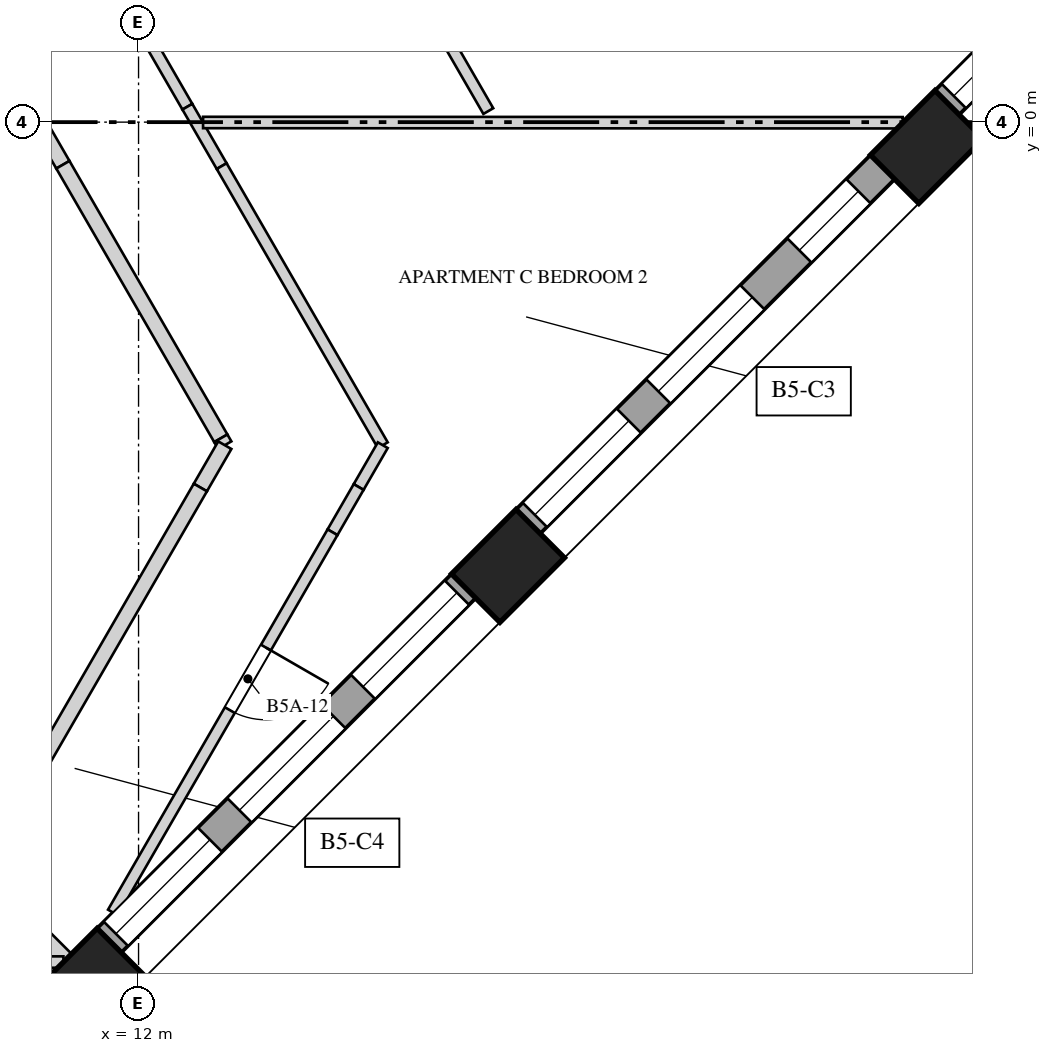
"""IFC4 building model, lengths in metres.
Left out: names, types, materials, properties, quantities, classifications, styles, units other than length and angle.
Written with IfcOpenShell. Run it as: python <this file> out.ifc"""

import sys

from ifc_helpers import new_model, si_unit, direction, frame, frame_2d, origin, origin_2d, place, context, subcontext, project, spatial, rectangle, extrude, element, fill, save


model = new_model("IFC4")
c1 = context("Model", 3, precision=1e-05, world=origin(), true_north=direction((0.0, 1.0)))
c2 = subcontext(c1, "Body", "Model", "MODEL_VIEW")
j1 = project(units=[si_unit("LENGTHUNIT", "METRE"), si_unit("PLANEANGLEUNIT", "RADIAN")], contexts=[c1])
p1 = place(None, origin())
s1 = spatial("IfcSite", under=j1, at=p1, CompositionType="ELEMENT")
p2 = place(p1, origin())
s2 = spatial("IfcBuilding", under=s1, at=p2, CompositionType="ELEMENT")
p3 = place(p2, frame((0.0, 0.0, 200.0)))
s3 = spatial("IfcBuildingStorey", under=s2, at=p3, CompositionType="ELEMENT", Elevation=200.0)
for number, where, z_axis, x_axis in (
    (1, (11.349, -11.349, -0.35), (0.0, 0.0, 1.0), (0.707, 0.707, 0.0)),
    (2, (16.86, -5.838, -0.35), (0.0, 0.0, 1.0), (0.707, 0.707, 0.0)),
    (3, (22.372, -0.326, -0.35), (0.0, 0.0, 1.0), (0.707, 0.707, 0.0)),
):
    element("IfcColumn", number, at=place(p3, frame(where, z_axis=z_axis, x_axis=x_axis)), inside=s3, PredefinedType="COLUMN", context=c2, shape_type="SweptSolid", body=[
        extrude(rectangle(XDim=1.2, YDim=0.9, at=origin_2d()), origin(), (0.0, 0.0, 1.0), 4.35),
    ])
p4 = place(p3, frame((11.614, -10.766, 0.0), z_axis=(0.0, 0.0, 1.0), x_axis=(0.707106781187, 0.707106781187, 0.0)))
e4 = element("IfcWall", 4, at=p4, inside=s3, PredefinedType="SOLIDWALL", context=c2, shape_type="SweptSolid", body=[
    extrude(rectangle(XDim=6.594, YDim=0.45, at=frame_2d((3.297, 0.0))), origin(), (0.0, 0.0, 1.0), 3.3),
])
p5 = place(p4, frame((0.124, 0.0, 0.5)))
e5 = element("IfcOpeningElement", 5, at=p5, cuts=e4, PredefinedType="OPENING", context=c2, shape_type="SweptSolid", body=[
    extrude(rectangle(XDim=1.75, YDim=2.65, at=frame_2d((0.875, 1.325))), frame((0.0, 0.235, 0.0), z_axis=(0.0, -1.0, 0.0), x_axis=(1.0, 0.0, 0.0)), (0.0, 0.0, 1.0), 0.47),
])
p6 = place(p4, frame((2.422, 0.0, 0.5)))
e6 = element("IfcOpeningElement", 6, at=p6, cuts=e4, PredefinedType="OPENING", context=c2, shape_type="SweptSolid", body=[
    extrude(rectangle(XDim=1.75, YDim=2.65, at=frame_2d((0.875, 1.325))), frame((0.0, 0.235, 0.0), z_axis=(0.0, -1.0, 0.0), x_axis=(1.0, 0.0, 0.0)), (0.0, 0.0, 1.0), 0.47),
])
p7 = place(p4, frame((4.72, 0.0, 0.5)))
e7 = element("IfcOpeningElement", 7, at=p7, cuts=e4, PredefinedType="OPENING", context=c2, shape_type="SweptSolid", body=[
    extrude(rectangle(XDim=1.75, YDim=2.65, at=frame_2d((0.875, 1.325))), frame((0.0, 0.235, 0.0), z_axis=(0.0, -1.0, 0.0), x_axis=(1.0, 0.0, 0.0)), (0.0, 0.0, 1.0), 0.47),
])
p8 = place(p3, frame((17.125, -5.254, 0.0), z_axis=(0.0, 0.0, 1.0), x_axis=(0.707106781187, 0.707106781187, 0.0)))
e8 = element("IfcWall", 8, at=p8, inside=s3, PredefinedType="SOLIDWALL", context=c2, shape_type="SweptSolid", body=[
    extrude(rectangle(XDim=6.594, YDim=0.45, at=frame_2d((3.297, 0.0))), origin(), (0.0, 0.0, 1.0), 3.3),
])
p9 = place(p8, frame((0.124, 0.0, 0.5)))
e9 = element("IfcOpeningElement", 9, at=p9, cuts=e8, PredefinedType="OPENING", context=c2, shape_type="SweptSolid", body=[
    extrude(rectangle(XDim=1.75, YDim=2.65, at=frame_2d((0.875, 1.325))), frame((0.0, 0.235, 0.0), z_axis=(0.0, -1.0, 0.0), x_axis=(1.0, 0.0, 0.0)), (0.0, 0.0, 1.0), 0.47),
])
p10 = place(p8, frame((2.422, 0.0, 0.5)))
e10 = element("IfcOpeningElement", 10, at=p10, cuts=e8, PredefinedType="OPENING", context=c2, shape_type="SweptSolid", body=[
    extrude(rectangle(XDim=1.75, YDim=2.65, at=frame_2d((0.875, 1.325))), frame((0.0, 0.235, 0.0), z_axis=(0.0, -1.0, 0.0), x_axis=(1.0, 0.0, 0.0)), (0.0, 0.0, 1.0), 0.47),
])
p11 = place(p8, frame((5.045, 0.0, 0.5)))
e11 = element("IfcOpeningElement", 11, at=p11, cuts=e8, PredefinedType="OPENING", context=c2, shape_type="SweptSolid", body=[
    extrude(rectangle(XDim=1.1, YDim=2.65, at=frame_2d((0.55, 1.325))), frame((0.0, 0.235, 0.0), z_axis=(0.0, -1.0, 0.0), x_axis=(1.0, 0.0, 0.0)), (0.0, 0.0, 1.0), 0.47),
])
p12 = place(p3, frame((22.637, 0.257, 0.0), z_axis=(0.0, 0.0, 1.0), x_axis=(0.707106781187, 0.707106781187, 0.0)))
e12 = element("IfcWall", 12, at=p12, inside=s3, PredefinedType="SOLIDWALL", context=c2, shape_type="SweptSolid", body=[
    extrude(rectangle(XDim=1.998, YDim=0.45, at=frame_2d((0.999, 0.0))), origin(), (0.0, 0.0, 1.0), 3.3),
])
p13 = place(p12, frame((0.124, 0.0, 0.5)))
e13 = element("IfcOpeningElement", 13, at=p13, cuts=e12, PredefinedType="OPENING", context=c2, shape_type="SweptSolid", body=[
    extrude(rectangle(XDim=1.75, YDim=2.65, at=frame_2d((0.875, 1.325))), frame((0.0, 0.235, 0.0), z_axis=(0.0, -1.0, 0.0), x_axis=(1.0, 0.0, 0.0)), (0.0, 0.0, 1.0), 0.47),
])
p14 = place(p3, frame((11.803, 1.656, 0.0), z_axis=(0.0, 0.0, 1.0), x_axis=(0.499974444137, -0.866040157966, 0.0)))
e14 = element("IfcWall", 14, at=p14, inside=s3, PredefinedType="PARTITIONING", context=c2, shape_type="SweptSolid", body=[
    extrude(rectangle(XDim=1.677, YDim=0.15, at=frame_2d((0.839, 0.0))), origin(), (0.0, 0.0, 1.0), 3.65),
])
p15 = place(p3, frame((12.642, 0.203, 0.0), z_axis=(0.0, 0.0, 1.0), x_axis=(0.500065807255, -0.865987406614, 0.0)))
e15 = element("IfcWall", 15, at=p15, inside=s3, PredefinedType="PARTITIONING", context=c2, shape_type="SweptSolid", body=[
    extrude(rectangle(XDim=0.903, YDim=0.15, at=frame_2d((0.451, 0.0))), origin(), (0.0, 0.0, 1.0), 2.75),
])
p16 = place(p3, frame((13.094, -0.579, 0.0), z_axis=(0.0, 0.0, 1.0), x_axis=(0.499991648869, -0.866030225258, 0.0)))
e16 = element("IfcWall", 16, at=p16, inside=s3, PredefinedType="PARTITIONING", context=c2, shape_type="SweptSolid", body=[
    extrude(rectangle(XDim=4.239, YDim=0.15, at=frame_2d((2.12, 0.0))), origin(), (0.0, 0.0, 1.0), 3.65),
])
p17 = place(p3, frame((9.35, -9.35, 0.0), z_axis=(0.0, 0.0, 1.0), x_axis=(0.707106781187, -0.707106781187, 0.0)))
e17 = element("IfcWall", 17, at=p17, inside=s3, PredefinedType="SOLIDWALL", context=c2, shape_type="SweptSolid", body=[
    extrude(rectangle(XDim=2.377, YDim=0.25, at=frame_2d((1.188, 0.0))), origin(), (0.0, 0.0, 1.0), 2.95),
])
p18 = place(p3, frame((11.012, -11.05, 0.0), z_axis=(0.0, 0.0, 1.0), x_axis=(-1.0, 0.0, 0.0)))
e18 = element("IfcWall", 18, at=p18, inside=s3, PredefinedType="PARTITIONING", context=c2, shape_type="SweptSolid", body=[
    extrude(rectangle(XDim=0.439, YDim=0.15, at=frame_2d((0.219, 0.0))), origin(), (0.0, 0.0, 1.0), 2.95),
])
p19 = place(p3, frame((15.364, 2.289, 0.0), z_axis=(0.0, 0.0, 1.0), x_axis=(0.499978546328, -0.866037789714, 0.0)))
e19 = element("IfcWall", 19, at=p19, inside=s3, PredefinedType="PARTITIONING", context=c2, shape_type="SweptSolid", body=[
    extrude(rectangle(XDim=2.476, YDim=0.15, at=frame_2d((1.238, 0.0))), origin(), (0.0, 0.0, 1.0), 3.65),
])
p20 = place(p3, frame((15.213, -4.25, 0.0), z_axis=(0.0, 0.0, 1.0), x_axis=(-0.499899851437, -0.866083216864, 0.0)))
e20 = element("IfcWall", 20, at=p20, inside=s3, PredefinedType="PARTITIONING", context=c2, shape_type="SweptSolid", body=[
    extrude(rectangle(XDim=0.635, YDim=0.15, at=frame_2d((0.318, 0.0))), origin(), (0.0, 0.0, 1.0), 3.65),
])
p21 = place(p3, frame((14.896, -4.8, 0.0), z_axis=(0.0, 0.0, 1.0), x_axis=(-0.5001118933, -0.865960792519, 0.0)))
e21 = element("IfcWall", 21, at=p21, inside=s3, PredefinedType="PARTITIONING", context=c2, shape_type="SweptSolid", body=[
    extrude(rectangle(XDim=0.687, YDim=0.15, at=frame_2d((0.344, 0.0))), origin(), (0.0, 0.0, 1.0), 2.95),
])
p22 = place(p3, frame((14.552, -5.396, 0.0), z_axis=(0.0, 0.0, 1.0), x_axis=(-0.499984646442, -0.866034267984, 0.0)))
e22 = element("IfcWall", 22, at=p22, inside=s3, PredefinedType="PARTITIONING", context=c2, shape_type="SweptSolid", body=[
    extrude(rectangle(XDim=5.777, YDim=0.15, at=frame_2d((2.888, 0.0))), origin(), (0.0, 0.0, 1.0), 3.65),
])
p23 = place(p22, frame((1.752, 0.0, 0.0)))
e23 = element("IfcOpeningElement", 23, at=p23, cuts=e22, PredefinedType="OPENING", context=c2, shape_type="SweptSolid", body=[
    extrude(rectangle(XDim=0.95, YDim=2.4, at=frame_2d((0.475, 1.2))), frame((0.0, 0.085, 0.0), z_axis=(0.0, -1.0, 0.0), x_axis=(1.0, 0.0, 0.0)), (0.0, 0.0, 1.0), 0.17),
])
p24 = place(p3, frame((22.053, -0.008, 0.0), z_axis=(0.0, 0.0, 1.0), x_axis=(-0.999999931056, 0.00037133306, 0.0)))
e24 = element("IfcWall", 24, at=p24, inside=s3, PredefinedType="PARTITIONING", context=c2, shape_type="SweptSolid", body=[
    extrude(rectangle(XDim=9.205, YDim=0.15, at=frame_2d((4.602, 0.0))), origin(), (0.0, 0.0, 1.0), 2.75),
])
p25 = place(p3, frame((10.539, 0.246, 0.0), z_axis=(0.0, 0.0, 1.0), x_axis=(0.499971966783, -0.866041588165, 0.0)))
e25 = element("IfcWall", 25, at=p25, inside=s3, PredefinedType="SOLIDWALL", context=c2, shape_type="SweptSolid", body=[
    extrude(rectangle(XDim=0.932, YDim=0.2, at=frame_2d((0.466, 0.0))), origin(), (0.0, 0.0, 1.0), 2.75),
])
p26 = place(p3, frame((11.005, -0.561, 0.0), z_axis=(0.0, 0.0, 1.0), x_axis=(0.499993700073, -0.866029041019, 0.0)))
e26 = element("IfcWall", 26, at=p26, inside=s3, PredefinedType="SOLIDWALL", context=c2, shape_type="SweptSolid", body=[
    extrude(rectangle(XDim=4.155, YDim=0.2, at=frame_2d((2.078, 0.0))), origin(), (0.0, 0.0, 1.0), 3.65),
])
p27 = place(p3, frame((13.082, -4.159, 0.0), z_axis=(0.0, 0.0, 1.0), x_axis=(0.500393920955, -0.865797853931, 0.0)))
e27 = element("IfcWall", 27, at=p27, inside=s3, PredefinedType="SOLIDWALL", context=c2, shape_type="SweptSolid", body=[
    extrude(rectangle(XDim=0.105, YDim=0.2, at=frame_2d((0.052, 0.0))), origin(), (0.0, 0.0, 1.0), 2.95),
])
p28 = place(p3, frame((13.135, -4.25, 0.0), z_axis=(0.0, 0.0, 1.0), x_axis=(-0.500018234033, -0.866014876105, 0.0)))
e28 = element("IfcWall", 28, at=p28, inside=s3, PredefinedType="SOLIDWALL", context=c2, shape_type="SweptSolid", body=[
    extrude(rectangle(XDim=0.643, YDim=0.2, at=frame_2d((0.322, 0.0))), origin(), (0.0, 0.0, 1.0), 2.95),
])
p29 = place(p3, frame((12.813, -4.807, 0.0), z_axis=(0.0, 0.0, 1.0), x_axis=(-0.499992949462, -0.866029474376, 0.0)))
e29 = element("IfcWall", 29, at=p29, inside=s3, PredefinedType="SOLIDWALL", context=c2, shape_type="SweptSolid", body=[
    extrude(rectangle(XDim=5.13, YDim=0.2, at=frame_2d((2.565, 0.0))), origin(), (0.0, 0.0, 1.0), 3.65),
])
p30 = place(p5, origin())
e30 = element("IfcWindow", 30, at=p30, inside=s3, PartitioningType="SINGLE_PANEL", PredefinedType="WINDOW", context=c2, shape_type="SweptSolid", body=[
    extrude(rectangle(XDim=1.75, YDim=2.65, at=frame_2d((0.875, 1.325))), frame((0.0, 0.03, 0.0), z_axis=(0.0, -1.0, 0.0), x_axis=(1.0, 0.0, 0.0)), (0.0, 0.0, 1.0), 0.06),
])
fill(e5, e30)
p31 = place(p6, origin())
e31 = element("IfcWindow", 31, at=p31, inside=s3, PartitioningType="SINGLE_PANEL", PredefinedType="WINDOW", context=c2, shape_type="SweptSolid", body=[
    extrude(rectangle(XDim=1.75, YDim=2.65, at=frame_2d((0.875, 1.325))), frame((0.0, 0.03, 0.0), z_axis=(0.0, -1.0, 0.0), x_axis=(1.0, 0.0, 0.0)), (0.0, 0.0, 1.0), 0.06),
])
fill(e6, e31)
p32 = place(p7, origin())
e32 = element("IfcWindow", 32, at=p32, inside=s3, PartitioningType="SINGLE_PANEL", PredefinedType="WINDOW", context=c2, shape_type="SweptSolid", body=[
    extrude(rectangle(XDim=1.75, YDim=2.65, at=frame_2d((0.875, 1.325))), frame((0.0, 0.03, 0.0), z_axis=(0.0, -1.0, 0.0), x_axis=(1.0, 0.0, 0.0)), (0.0, 0.0, 1.0), 0.06),
])
fill(e7, e32)
p33 = place(p9, origin())
e33 = element("IfcWindow", 33, at=p33, inside=s3, PartitioningType="SINGLE_PANEL", PredefinedType="WINDOW", context=c2, shape_type="SweptSolid", body=[
    extrude(rectangle(XDim=1.75, YDim=2.65, at=frame_2d((0.875, 1.325))), frame((0.0, 0.03, 0.0), z_axis=(0.0, -1.0, 0.0), x_axis=(1.0, 0.0, 0.0)), (0.0, 0.0, 1.0), 0.06),
])
fill(e9, e33)
p34 = place(p10, origin())
e34 = element("IfcWindow", 34, at=p34, inside=s3, PartitioningType="SINGLE_PANEL", PredefinedType="WINDOW", context=c2, shape_type="SweptSolid", body=[
    extrude(rectangle(XDim=1.75, YDim=2.65, at=frame_2d((0.875, 1.325))), frame((0.0, 0.03, 0.0), z_axis=(0.0, -1.0, 0.0), x_axis=(1.0, 0.0, 0.0)), (0.0, 0.0, 1.0), 0.06),
])
fill(e10, e34)
p35 = place(p11, origin())
e35 = element("IfcWindow", 35, at=p35, inside=s3, PartitioningType="SINGLE_PANEL", PredefinedType="WINDOW", context=c2, shape_type="SweptSolid", body=[
    extrude(rectangle(XDim=1.1, YDim=2.65, at=frame_2d((0.55, 1.325))), frame((0.0, 0.03, 0.0), z_axis=(0.0, -1.0, 0.0), x_axis=(1.0, 0.0, 0.0)), (0.0, 0.0, 1.0), 0.06),
])
fill(e11, e35)
p36 = place(p13, origin())
e36 = element("IfcWindow", 36, at=p36, inside=s3, PartitioningType="SINGLE_PANEL", PredefinedType="WINDOW", context=c2, shape_type="SweptSolid", body=[
    extrude(rectangle(XDim=1.75, YDim=2.65, at=frame_2d((0.875, 1.325))), frame((0.0, 0.03, 0.0), z_axis=(0.0, -1.0, 0.0), x_axis=(1.0, 0.0, 0.0)), (0.0, 0.0, 1.0), 0.06),
])
fill(e13, e36)
p37 = place(p23, origin())
e37 = element("IfcDoor", 37, at=p37, inside=s3, OperationType="SINGLE_SWING_RIGHT", PredefinedType="DOOR", context=c2, shape_type="SweptSolid", body=[
    extrude(rectangle(XDim=0.95, YDim=2.4, at=frame_2d((0.475, 1.2))), frame((0.0, 0.025, 0.0), z_axis=(0.0, -1.0, 0.0), x_axis=(1.0, 0.0, 0.0)), (0.0, 0.0, 1.0), 0.05),
])
fill(e23, e37)
save(model, sys.argv[1])
